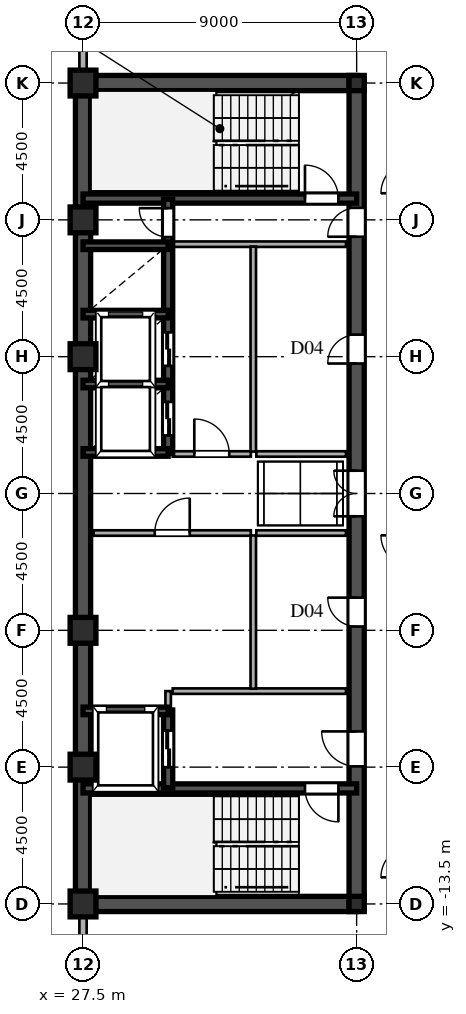
"""IFC4 building model, lengths in metres.
Left out: names, types, materials, properties, quantities, classifications, styles, units other than length and angle.
Written with IfcOpenShell. Run it as: python <this file> out.ifc"""

import sys

from ifc_helpers import new_model, si_unit, direction, frame, frame_2d, origin, origin_2d, place, context, subcontext, project, spatial, rectangle, hollow_rectangle, i_section, extrude, source, transform, mapped, element, fill, save


model = new_model("IFC4")
c1 = context("Model", 3, precision=1e-05, world=origin(), true_north=direction((0.0, 1.0)))
c2 = subcontext(c1, "Body", "Model", "MODEL_VIEW")
j1 = project(units=[si_unit("LENGTHUNIT", "METRE"), si_unit("PLANEANGLEUNIT", "RADIAN")], contexts=[c1])
p1 = place(None, origin())
s1 = spatial("IfcSite", under=j1, at=p1, CompositionType="ELEMENT")
p2 = place(p1, origin())
s2 = spatial("IfcBuilding", under=s1, at=p2, CompositionType="ELEMENT")
p3 = place(p2, frame((0.0, 0.0, 217.5)))
s3 = spatial("IfcBuildingStorey", under=s2, at=p3, CompositionType="ELEMENT", Elevation=217.5)
m1 = source(origin(), c2, "Body", "SweptSolid", [
    extrude(hollow_rectangle(XDim=0.85, YDim=0.85, WallThickness=0.036, at=origin_2d()), origin(), (0.0, 0.0, 1.0), 3.6),
])
for number, where, z_axis, x_axis in (
    (1, (27.5, -13.5, 0.0), (0.0, 0.0, 1.0), (1.0, 0.0, 0.0)),
    (2, (27.5, -9.0, 0.0), (0.0, 0.0, 1.0), (1.0, 0.0, 0.0)),
    (3, (27.5, -4.5, 0.0), (0.0, 0.0, 1.0), (1.0, 0.0, 0.0)),
    (4, (27.5, 4.5, 0.0), (0.0, 0.0, 1.0), (1.0, 0.0, 0.0)),
    (5, (27.5, 9.0, 0.0), (0.0, 0.0, 1.0), (1.0, 0.0, 0.0)),
    (6, (27.5, 13.5, 0.0), (0.0, 0.0, 1.0), (1.0, 0.0, 0.0)),
):
    element("IfcColumn", number, at=place(p3, frame(where, z_axis=z_axis, x_axis=x_axis)), inside=s3, PredefinedType="COLUMN", context=c2, shape_type="MappedRepresentation", body=[
        mapped(m1, transform((0.0, 0.0, 0.0), scale=1.0)),
    ])
m2 = source(origin(), c2, "Body", "SweptSolid", [
    extrude(i_section(OverallWidth=0.5, OverallDepth=0.5, WebThickness=0.02, FlangeThickness=0.032, at=origin_2d()), origin(), (0.0, 0.0, 1.0), 3.6),
])
for number, where, z_axis, x_axis in (
    (7, (36.5, -13.5, 0.0), (0.0, 0.0, 1.0), (1.0, 0.0, 0.0)),
    (8, (36.5, 13.5, 0.0), (0.0, 0.0, 1.0), (1.0, 0.0, 0.0)),
):
    element("IfcColumn", number, at=place(p3, frame(where, z_axis=z_axis, x_axis=x_axis)), inside=s3, PredefinedType="COLUMN", context=c2, shape_type="MappedRepresentation", body=[
        mapped(m2, transform((0.0, 0.0, 0.0), scale=1.0)),
    ])
p4 = place(p3, frame((27.5, -15.98, 0.0), z_axis=(0.0, 0.0, 1.0), x_axis=(0.0, 1.0, 0.0)))
e9 = element("IfcWall", 9, at=p4, inside=s3, PredefinedType="SOLIDWALL", context=c2, shape_type="SweptSolid", body=[
    extrude(rectangle(XDim=1.605, YDim=0.24, at=frame_2d((0.803, 0.0))), origin(), (0.0, 0.0, 1.0), 3.38),
])
for number, where, z_axis, x_axis in (
    (10, (27.5, -14.375, 0.0), (0.0, 0.0, 1.0), (0.0, 1.0, 0.0)),
    (11, (27.5, 13.755, 0.0), (0.0, 0.0, 1.0), (0.0, 1.0, 0.0)),
):
    element("IfcWall", number, at=place(p3, frame(where, z_axis=z_axis, x_axis=x_axis)), inside=s3, PredefinedType="SOLIDWALL", context=c2, shape_type="SweptSolid", body=[
        extrude(rectangle(XDim=0.62, YDim=0.24, at=frame_2d((0.31, 0.0))), origin(), (0.0, 0.0, 1.0), 2.88),
    ])
p5 = place(p3, frame((27.5, 14.375, 0.0), z_axis=(0.0, 0.0, 1.0), x_axis=(0.0, 1.0, 0.0)))
e12 = element("IfcWall", 12, at=p5, inside=s3, PredefinedType="SOLIDWALL", context=c2, shape_type="SweptSolid", body=[
    extrude(rectangle(XDim=1.605, YDim=0.24, at=frame_2d((0.803, 0.0))), origin(), (0.0, 0.0, 1.0), 3.38),
])
for number, where, z_axis, x_axis in (
    (13, (27.5, -13.5, 0.0), (0.0, 0.0, 1.0), (0.0, 1.0, 0.0)),
    (14, (27.5, 1.3, 0.0), (0.0, 0.0, 1.0), (0.0, 1.0, 0.0)),
):
    element("IfcWall", number, at=place(p3, frame(where, z_axis=z_axis, x_axis=x_axis)), inside=s3, PredefinedType="SHEAR", context=c2, shape_type="SweptSolid", body=[
        extrude(rectangle(XDim=12.2, YDim=0.5, at=frame_2d((6.1, 0.0))), origin(), (0.0, 0.0, 1.0), 3.38),
    ])
p6 = place(p3, frame((27.5, -1.3, 0.0), z_axis=(0.0, 0.0, 1.0), x_axis=(0.0, 1.0, 0.0)))
e15 = element("IfcWall", 15, at=p6, inside=s3, PredefinedType="SHEAR", context=c2, shape_type="SweptSolid", body=[
    extrude(rectangle(XDim=2.6, YDim=0.5, at=frame_2d((1.3, 0.0))), origin(), (0.0, 0.0, 1.0), 3.38),
])
for number, where, z_axis, x_axis in (
    (16, (27.5, -13.5, 0.0), (0.0, 0.0, 1.0), (1.0, 0.0, 0.0)),
    (17, (27.5, 13.5, 0.0), (0.0, 0.0, 1.0), (1.0, 0.0, 0.0)),
):
    element("IfcWall", number, at=place(p3, frame(where, z_axis=z_axis, x_axis=x_axis)), inside=s3, PredefinedType="SHEAR", context=c2, shape_type="SweptSolid", body=[
        extrude(rectangle(XDim=9.0, YDim=0.5, at=frame_2d((4.5, 0.0))), origin(), (0.0, 0.0, 1.0), 3.38),
    ])
p7 = place(p3, frame((36.5, -13.65, 0.0), z_axis=(0.0, 0.0, 1.0), x_axis=(0.0, 1.0, 0.0)))
e18 = element("IfcWall", 18, at=p7, inside=s3, PredefinedType="SHEAR", context=c2, shape_type="SweptSolid", body=[
    extrude(rectangle(XDim=7.15, YDim=0.5, at=frame_2d((3.575, 0.0))), origin(), (0.0, 0.0, 1.0), 3.38),
])
p8 = place(p7, frame((4.675, 0.0, 0.0)))
e19 = element("IfcOpeningElement", 19, at=p8, cuts=e18, PredefinedType="OPENING", context=c2, shape_type="SweptSolid", body=[
    extrude(rectangle(XDim=1.15, YDim=2.2, at=frame_2d((0.575, 1.1))), frame((0.0, 0.26, 0.0), z_axis=(0.0, -1.0, 0.0), x_axis=(1.0, 0.0, 0.0)), (0.0, 0.0, 1.0), 0.52),
])
p9 = place(p3, frame((36.5, -1.3, 0.0), z_axis=(0.0, 0.0, 1.0), x_axis=(0.0, 1.0, 0.0)))
e20 = element("IfcWall", 20, at=p9, inside=s3, PredefinedType="SHEAR", context=c2, shape_type="SweptSolid", body=[
    extrude(rectangle(XDim=2.6, YDim=0.5, at=frame_2d((1.3, 0.0))), origin(), (0.0, 0.0, 1.0), 3.38),
])
p10 = place(p9, frame((0.55, 0.0, 0.0)))
e21 = element("IfcOpeningElement", 21, at=p10, cuts=e20, PredefinedType="OPENING", context=c2, shape_type="SweptSolid", body=[
    extrude(rectangle(XDim=1.5, YDim=2.3, at=frame_2d((0.75, 1.15))), frame((0.0, 0.26, 0.0), z_axis=(0.0, -1.0, 0.0), x_axis=(1.0, 0.0, 0.0)), (0.0, 0.0, 1.0), 0.52),
])
p11 = place(p3, frame((36.5, 8.2, 0.0), z_axis=(0.0, 0.0, 1.0), x_axis=(0.0, 1.0, 0.0)))
e22 = element("IfcWall", 22, at=p11, inside=s3, PredefinedType="SHEAR", context=c2, shape_type="SweptSolid", body=[
    extrude(rectangle(XDim=5.45, YDim=0.5, at=frame_2d((2.725, 0.0))), origin(), (0.0, 0.0, 1.0), 3.38),
])
p12 = place(p11, frame((0.245, 0.0, 0.0)))
e23 = element("IfcOpeningElement", 23, at=p12, cuts=e22, PredefinedType="OPENING", context=c2, shape_type="SweptSolid", body=[
    extrude(rectangle(XDim=0.95, YDim=2.15, at=frame_2d((0.475, 1.075))), frame((0.0, 0.26, 0.0), z_axis=(0.0, -1.0, 0.0), x_axis=(1.0, 0.0, 0.0)), (0.0, 0.0, 1.0), 0.52),
])
p13 = place(p3, frame((36.5, -6.5, 0.0), z_axis=(0.0, 0.0, 1.0), x_axis=(0.0, 1.0, 0.0)))
e24 = element("IfcWall", 24, at=p13, inside=s3, PredefinedType="SHEAR", context=c2, shape_type="SweptSolid", body=[
    extrude(rectangle(XDim=5.2, YDim=0.5, at=frame_2d((2.6, 0.0))), origin(), (0.0, 0.0, 1.0), 3.38),
])
p14 = place(p13, frame((2.125, 0.0, 0.0)))
e25 = element("IfcOpeningElement", 25, at=p14, cuts=e24, PredefinedType="OPENING", context=c2, shape_type="SweptSolid", body=[
    extrude(rectangle(XDim=0.95, YDim=2.15, at=frame_2d((0.475, 1.075))), frame((0.0, 0.26, 0.0), z_axis=(0.0, -1.0, 0.0), x_axis=(1.0, 0.0, 0.0)), (0.0, 0.0, 1.0), 0.52),
])
p15 = place(p3, frame((36.5, 1.3, 0.0), z_axis=(0.0, 0.0, 1.0), x_axis=(0.0, 1.0, 0.0)))
e26 = element("IfcWall", 26, at=p15, inside=s3, PredefinedType="SHEAR", context=c2, shape_type="SweptSolid", body=[
    extrude(rectangle(XDim=6.9, YDim=0.5, at=frame_2d((3.45, 0.0))), origin(), (0.0, 0.0, 1.0), 3.38),
])
p16 = place(p15, frame((2.975, 0.0, 0.0)))
e27 = element("IfcOpeningElement", 27, at=p16, cuts=e26, PredefinedType="OPENING", context=c2, shape_type="SweptSolid", body=[
    extrude(rectangle(XDim=0.95, YDim=2.15, at=frame_2d((0.475, 1.075))), frame((0.0, 0.26, 0.0), z_axis=(0.0, -1.0, 0.0), x_axis=(1.0, 0.0, 0.0)), (0.0, 0.0, 1.0), 0.52),
])
p17 = place(p3, frame((27.5, -9.7, 0.0), z_axis=(0.0, 0.0, 1.0), x_axis=(1.0, 0.0, 0.0)))
e28 = element("IfcWall", 28, at=p17, inside=s3, PredefinedType="SHEAR", context=c2, shape_type="SweptSolid", body=[
    extrude(rectangle(XDim=9.0, YDim=0.3, at=frame_2d((4.5, 0.0))), origin(), (0.0, 0.0, 1.0), 3.38),
])
p18 = place(p17, frame((7.3, 0.0, 0.0)))
e29 = element("IfcOpeningElement", 29, at=p18, cuts=e28, PredefinedType="OPENING", context=c2, shape_type="SweptSolid", body=[
    extrude(rectangle(XDim=1.1, YDim=2.2, at=frame_2d((0.55, 1.1))), frame((0.0, 0.16, 0.0), z_axis=(0.0, -1.0, 0.0), x_axis=(1.0, 0.0, 0.0)), (0.0, 0.0, 1.0), 0.32),
])
p19 = place(p3, frame((27.5, 9.7, 0.0), z_axis=(0.0, 0.0, 1.0), x_axis=(1.0, 0.0, 0.0)))
e30 = element("IfcWall", 30, at=p19, inside=s3, PredefinedType="SHEAR", context=c2, shape_type="SweptSolid", body=[
    extrude(rectangle(XDim=9.0, YDim=0.3, at=frame_2d((4.5, 0.0))), origin(), (0.0, 0.0, 1.0), 3.38),
])
p20 = place(p19, frame((7.3, 0.0, 0.0)))
e31 = element("IfcOpeningElement", 31, at=p20, cuts=e30, PredefinedType="OPENING", context=c2, shape_type="SweptSolid", body=[
    extrude(rectangle(XDim=1.1, YDim=2.2, at=frame_2d((0.55, 1.1))), frame((0.0, 0.16, 0.0), z_axis=(0.0, -1.0, 0.0), x_axis=(1.0, 0.0, 0.0)), (0.0, 0.0, 1.0), 0.32),
])
for number, where, z_axis, x_axis in (
    (32, (27.5, -7.15, 0.0), (0.0, 0.0, 1.0), (1.0, 0.0, 0.0)),
    (33, (27.5, 1.35, 0.0), (0.0, 0.0, 1.0), (1.0, 0.0, 0.0)),
    (34, (27.5, 3.6, 0.0), (0.0, 0.0, 1.0), (1.0, 0.0, 0.0)),
    (35, (27.5, 5.9, 0.0), (0.0, 0.0, 1.0), (1.0, 0.0, 0.0)),
    (36, (27.5, 8.15, 0.0), (0.0, 0.0, 1.0), (1.0, 0.0, 0.0)),
):
    element("IfcWall", number, at=place(p3, frame(where, z_axis=z_axis, x_axis=x_axis)), inside=s3, PredefinedType="SHEAR", context=c2, shape_type="SweptSolid", body=[
        extrude(rectangle(XDim=2.8, YDim=0.25, at=frame_2d((1.4, 0.0))), origin(), (0.0, 0.0, 1.0), 3.38),
    ])
p21 = place(p3, frame((30.3, -9.68, 0.0), z_axis=(0.0, 0.0, 1.0), x_axis=(0.0, 1.0, 0.0)))
e37 = element("IfcWall", 37, at=p21, inside=s3, PredefinedType="SHEAR", context=c2, shape_type="SweptSolid", body=[
    extrude(rectangle(XDim=2.56, YDim=0.3, at=frame_2d((1.28, 0.0))), origin(), (0.0, 0.0, 1.0), 3.38),
])
p22 = place(p21, frame((0.68, 0.0, 0.0)))
e38 = element("IfcOpeningElement", 38, at=p22, cuts=e37, PredefinedType="OPENING", context=c2, shape_type="SweptSolid", body=[
    extrude(rectangle(XDim=1.2, YDim=2.25, at=frame_2d((0.6, 1.125))), frame((0.0, 0.16, 0.0), z_axis=(0.0, -1.0, 0.0), x_axis=(1.0, 0.0, 0.0)), (0.0, 0.0, 1.0), 0.32),
])
p23 = place(p3, frame((30.3, 1.32, 0.0), z_axis=(0.0, 0.0, 1.0), x_axis=(0.0, 1.0, 0.0)))
e39 = element("IfcWall", 39, at=p23, inside=s3, PredefinedType="SHEAR", context=c2, shape_type="SweptSolid", body=[
    extrude(rectangle(XDim=2.28, YDim=0.3, at=frame_2d((1.14, 0.0))), origin(), (0.0, 0.0, 1.0), 3.38),
])
p24 = place(p23, frame((0.59, 0.0, 0.0)))
e40 = element("IfcOpeningElement", 40, at=p24, cuts=e39, PredefinedType="OPENING", context=c2, shape_type="SweptSolid", body=[
    extrude(rectangle(XDim=1.1, YDim=2.2, at=frame_2d((0.55, 1.1))), frame((0.0, 0.16, 0.0), z_axis=(0.0, -1.0, 0.0), x_axis=(1.0, 0.0, 0.0)), (0.0, 0.0, 1.0), 0.32),
])
p25 = place(p3, frame((30.3, 3.6, 0.0), z_axis=(0.0, 0.0, 1.0), x_axis=(0.0, 1.0, 0.0)))
e41 = element("IfcWall", 41, at=p25, inside=s3, PredefinedType="SHEAR", context=c2, shape_type="SweptSolid", body=[
    extrude(rectangle(XDim=2.3, YDim=0.3, at=frame_2d((1.15, 0.0))), origin(), (0.0, 0.0, 1.0), 3.38),
])
p26 = place(p25, frame((0.6, 0.0, 0.0)))
e42 = element("IfcOpeningElement", 42, at=p26, cuts=e41, PredefinedType="OPENING", context=c2, shape_type="SweptSolid", body=[
    extrude(rectangle(XDim=1.1, YDim=2.2, at=frame_2d((0.55, 1.1))), frame((0.0, 0.16, 0.0), z_axis=(0.0, -1.0, 0.0), x_axis=(1.0, 0.0, 0.0)), (0.0, 0.0, 1.0), 0.32),
])
p27 = place(p3, frame((30.3, 5.9, 0.0), z_axis=(0.0, 0.0, 1.0), x_axis=(0.0, 1.0, 0.0)))
e43 = element("IfcWall", 43, at=p27, inside=s3, PredefinedType="SHEAR", context=c2, shape_type="SweptSolid", body=[
    extrude(rectangle(XDim=2.25, YDim=0.3, at=frame_2d((1.125, 0.0))), origin(), (0.0, 0.0, 1.0), 3.38),
])
p28 = place(p3, frame((30.3, 8.15, 0.0), z_axis=(0.0, 0.0, 1.0), x_axis=(0.0, 1.0, 0.0)))
e44 = element("IfcWall", 44, at=p28, inside=s3, PredefinedType="SHEAR", context=c2, shape_type="SweptSolid", body=[
    extrude(rectangle(XDim=1.53, YDim=0.3, at=frame_2d((0.765, 0.0))), origin(), (0.0, 0.0, 1.0), 3.38),
])
p29 = place(p28, frame((0.285, 0.0, 0.0)))
e45 = element("IfcOpeningElement", 45, at=p29, cuts=e44, PredefinedType="OPENING", context=c2, shape_type="SweptSolid", body=[
    extrude(rectangle(XDim=0.95, YDim=2.15, at=frame_2d((0.475, 1.075))), frame((0.0, 0.16, 0.0), z_axis=(0.0, -1.0, 0.0), x_axis=(1.0, 0.0, 0.0)), (0.0, 0.0, 1.0), 0.32),
])
p30 = place(p3, frame((30.45, -6.5, 0.0), z_axis=(0.0, 0.0, 1.0), x_axis=(1.0, 0.0, 0.0)))
e46 = element("IfcWall", 46, at=p30, inside=s3, PredefinedType="PARTITIONING", context=c2, shape_type="SweptSolid", body=[
    extrude(rectangle(XDim=5.7, YDim=0.18, at=frame_2d((2.85, 0.0))), origin(), (0.0, 0.0, 1.0), 3.38),
])
p31 = place(p3, frame((30.3, -7.12, 0.0), z_axis=(0.0, 0.0, 1.0), x_axis=(0.0, 1.0, 0.0)))
e47 = element("IfcWall", 47, at=p31, inside=s3, PredefinedType="PARTITIONING", context=c2, shape_type="SweptSolid", body=[
    extrude(rectangle(XDim=0.62, YDim=0.18, at=frame_2d((0.31, 0.0))), origin(), (0.0, 0.0, 1.0), 3.38),
])
p32 = place(p3, frame((30.45, 8.2, 0.0), z_axis=(0.0, 0.0, 1.0), x_axis=(1.0, 0.0, 0.0)))
e48 = element("IfcWall", 48, at=p32, inside=s3, PredefinedType="PARTITIONING", context=c2, shape_type="SweptSolid", body=[
    extrude(rectangle(XDim=5.7, YDim=0.18, at=frame_2d((2.85, 0.0))), origin(), (0.0, 0.0, 1.0), 3.38),
])
p33 = place(p3, frame((33.1, -6.42, 0.0), z_axis=(0.0, 0.0, 1.0), x_axis=(0.0, 1.0, 0.0)))
e49 = element("IfcWall", 49, at=p33, inside=s3, PredefinedType="PARTITIONING", context=c2, shape_type="SweptSolid", body=[
    extrude(rectangle(XDim=5.04, YDim=0.18, at=frame_2d((2.52, 0.0))), origin(), (0.0, 0.0, 1.0), 3.38),
])
p34 = place(p3, frame((33.1, 1.38, 0.0), z_axis=(0.0, 0.0, 1.0), x_axis=(0.0, 1.0, 0.0)))
e50 = element("IfcWall", 50, at=p34, inside=s3, PredefinedType="PARTITIONING", context=c2, shape_type="SweptSolid", body=[
    extrude(rectangle(XDim=6.74, YDim=0.18, at=frame_2d((3.37, 0.0))), origin(), (0.0, 0.0, 1.0), 3.38),
])
p35 = place(p3, frame((27.85, -1.3, 0.0), z_axis=(0.0, 0.0, 1.0), x_axis=(1.0, 0.0, 0.0)))
e51 = element("IfcWall", 51, at=p35, inside=s3, PredefinedType="PARTITIONING", context=c2, shape_type="SweptSolid", body=[
    extrude(rectangle(XDim=5.17, YDim=0.18, at=frame_2d((2.585, 0.0))), origin(), (0.0, 0.0, 1.0), 3.38),
])
p36 = place(p35, frame((2.01, 0.0, 0.0)))
e52 = element("IfcOpeningElement", 52, at=p36, cuts=e51, PredefinedType="OPENING", context=c2, shape_type="SweptSolid", body=[
    extrude(rectangle(XDim=1.15, YDim=2.2, at=frame_2d((0.575, 1.1))), frame((0.0, 0.1, 0.0), z_axis=(0.0, -1.0, 0.0), x_axis=(1.0, 0.0, 0.0)), (0.0, 0.0, 1.0), 0.2),
])
p37 = place(p3, frame((30.45, 1.3, 0.0), z_axis=(0.0, 0.0, 1.0), x_axis=(1.0, 0.0, 0.0)))
e53 = element("IfcWall", 53, at=p37, inside=s3, PredefinedType="PARTITIONING", context=c2, shape_type="SweptSolid", body=[
    extrude(rectangle(XDim=2.57, YDim=0.18, at=frame_2d((1.285, 0.0))), origin(), (0.0, 0.0, 1.0), 3.38),
])
p38 = place(p37, frame((0.71, 0.0, 0.0)))
e54 = element("IfcOpeningElement", 54, at=p38, cuts=e53, PredefinedType="OPENING", context=c2, shape_type="SweptSolid", body=[
    extrude(rectangle(XDim=1.15, YDim=2.2, at=frame_2d((0.575, 1.1))), frame((0.0, 0.1, 0.0), z_axis=(0.0, -1.0, 0.0), x_axis=(1.0, 0.0, 0.0)), (0.0, 0.0, 1.0), 0.2),
])
for number, where, z_axis, x_axis in (
    (55, (33.2, -1.3, 0.0), (0.0, 0.0, 1.0), (1.0, 0.0, 0.0)),
    (56, (33.2, 1.3, 0.0), (0.0, 0.0, 1.0), (1.0, 0.0, 0.0)),
):
    element("IfcWall", number, at=place(p3, frame(where, z_axis=z_axis, x_axis=x_axis)), inside=s3, PredefinedType="PARTITIONING", context=c2, shape_type="SweptSolid", body=[
        extrude(rectangle(XDim=2.95, YDim=0.18, at=frame_2d((1.475, 0.0))), origin(), (0.0, 0.0, 1.0), 3.38),
    ])
m3 = source(origin(), c2, "Body", "SweptSolid", [
    extrude(rectangle(XDim=1.15, YDim=2.2, at=frame_2d((0.575, 1.1))), frame((0.0, 0.025, 0.0), z_axis=(0.0, -1.0, 0.0), x_axis=(1.0, 0.0, 0.0)), (0.0, 0.0, 1.0), 0.05),
])
p39 = place(p8, origin())
e57 = element("IfcDoor", 57, at=p39, inside=s3, OperationType="SINGLE_SWING_RIGHT", PredefinedType="DOOR", context=c2, shape_type="MappedRepresentation", body=[
    mapped(m3, transform((0.0, 0.0, 0.0), scale=1.0)),
])
fill(e19, e57)
m4 = source(origin(), c2, "Body", "SweptSolid", [
    extrude(rectangle(XDim=1.5, YDim=2.3, at=frame_2d((0.75, 1.15))), frame((0.0, 0.025, 0.0), z_axis=(0.0, -1.0, 0.0), x_axis=(1.0, 0.0, 0.0)), (0.0, 0.0, 1.0), 0.05),
])
p40 = place(p10, origin())
e58 = element("IfcDoor", 58, at=p40, inside=s3, OperationType="DOUBLE_SWING_LEFT", PredefinedType="DOOR", context=c2, shape_type="MappedRepresentation", body=[
    mapped(m4, transform((0.0, 0.0, 0.0), scale=1.0)),
])
fill(e21, e58)
m5 = source(origin(), c2, "Body", "SweptSolid", [
    extrude(rectangle(XDim=0.95, YDim=2.15, at=frame_2d((0.475, 1.075))), frame((0.0, 0.025, 0.0), z_axis=(0.0, -1.0, 0.0), x_axis=(1.0, 0.0, 0.0)), (0.0, 0.0, 1.0), 0.05),
])
p41 = place(p12, origin())
e59 = element("IfcDoor", 59, at=p41, inside=s3, OperationType="SINGLE_SWING_LEFT", PredefinedType="DOOR", context=c2, shape_type="MappedRepresentation", body=[
    mapped(m5, transform((0.0, 0.0, 0.0), scale=1.0)),
])
fill(e23, e59)
p42 = place(p14, origin())
e60 = element("IfcDoor", 60, at=p42, inside=s3, OperationType="SINGLE_SWING_RIGHT", PredefinedType="DOOR", context=c2, shape_type="MappedRepresentation", body=[
    mapped(m5, transform((0.0, 0.0, 0.0), scale=1.0)),
])
fill(e25, e60)
p43 = place(p16, origin())
e61 = element("IfcDoor", 61, at=p43, inside=s3, OperationType="SINGLE_SWING_LEFT", PredefinedType="DOOR", context=c2, shape_type="MappedRepresentation", body=[
    mapped(m5, transform((0.0, 0.0, 0.0), scale=1.0)),
])
fill(e27, e61)
m6 = source(origin(), c2, "Body", "SweptSolid", [
    extrude(rectangle(XDim=1.1, YDim=2.2, at=frame_2d((0.55, 1.1))), frame((0.0, 0.025, 0.0), z_axis=(0.0, -1.0, 0.0), x_axis=(1.0, 0.0, 0.0)), (0.0, 0.0, 1.0), 0.05),
])
p44 = place(p18, frame((1.1, 0.0, 0.0), z_axis=(0.0, 0.0, 1.0), x_axis=(-1.0, 0.0, 0.0)))
e62 = element("IfcDoor", 62, at=p44, inside=s3, OperationType="SINGLE_SWING_RIGHT", PredefinedType="DOOR", context=c2, shape_type="MappedRepresentation", body=[
    mapped(m6, transform((0.0, 0.0, 0.0), scale=1.0)),
])
fill(e29, e62)
p45 = place(p20, origin())
e63 = element("IfcDoor", 63, at=p45, inside=s3, OperationType="SINGLE_SWING_LEFT", PredefinedType="DOOR", context=c2, shape_type="MappedRepresentation", body=[
    mapped(m6, transform((0.0, 0.0, 0.0), scale=1.0)),
])
fill(e31, e63)
m7 = source(origin(), c2, "Body", "SweptSolid", [
    extrude(rectangle(XDim=1.2, YDim=2.25, at=frame_2d((0.6, 1.125))), frame((0.0, 0.025, 0.0), z_axis=(0.0, -1.0, 0.0), x_axis=(1.0, 0.0, 0.0)), (0.0, 0.0, 1.0), 0.05),
])
p46 = place(p22, origin())
e64 = element("IfcDoor", 64, at=p46, inside=s3, OperationType="DOUBLE_DOOR_SLIDING", PredefinedType="DOOR", context=c2, shape_type="MappedRepresentation", body=[
    mapped(m7, transform((0.0, 0.0, 0.0), scale=1.0)),
])
fill(e38, e64)
m8 = source(origin(), c2, "Body", "SweptSolid", [
    extrude(rectangle(XDim=1.1, YDim=2.2, at=frame_2d((0.55, 1.1))), frame((0.0, 0.025, 0.0), z_axis=(0.0, -1.0, 0.0), x_axis=(1.0, 0.0, 0.0)), (0.0, 0.0, 1.0), 0.05),
])
p47 = place(p24, origin())
e65 = element("IfcDoor", 65, at=p47, inside=s3, OperationType="DOUBLE_DOOR_SLIDING", PredefinedType="DOOR", context=c2, shape_type="MappedRepresentation", body=[
    mapped(m8, transform((0.0, 0.0, 0.0), scale=1.0)),
])
fill(e40, e65)
p48 = place(p26, origin())
e66 = element("IfcDoor", 66, at=p48, inside=s3, OperationType="DOUBLE_DOOR_SLIDING", PredefinedType="DOOR", context=c2, shape_type="MappedRepresentation", body=[
    mapped(m8, transform((0.0, 0.0, 0.0), scale=1.0)),
])
fill(e42, e66)
p49 = place(p29, origin())
e67 = element("IfcDoor", 67, at=p49, inside=s3, OperationType="SINGLE_SWING_RIGHT", PredefinedType="DOOR", context=c2, shape_type="MappedRepresentation", body=[
    mapped(m5, transform((0.0, 0.0, 0.0), scale=1.0)),
])
fill(e45, e67)
p50 = place(p36, origin())
e68 = element("IfcDoor", 68, at=p50, inside=s3, OperationType="SINGLE_SWING_RIGHT", PredefinedType="DOOR", context=c2, shape_type="MappedRepresentation", body=[
    mapped(m3, transform((0.0, 0.0, 0.0), scale=1.0)),
])
fill(e52, e68)
p51 = place(p38, origin())
e69 = element("IfcDoor", 69, at=p51, inside=s3, OperationType="SINGLE_SWING_LEFT", PredefinedType="DOOR", context=c2, shape_type="MappedRepresentation", body=[
    mapped(m3, transform((0.0, 0.0, 0.0), scale=1.0)),
])
fill(e54, e69)
save(model, sys.argv[1])
